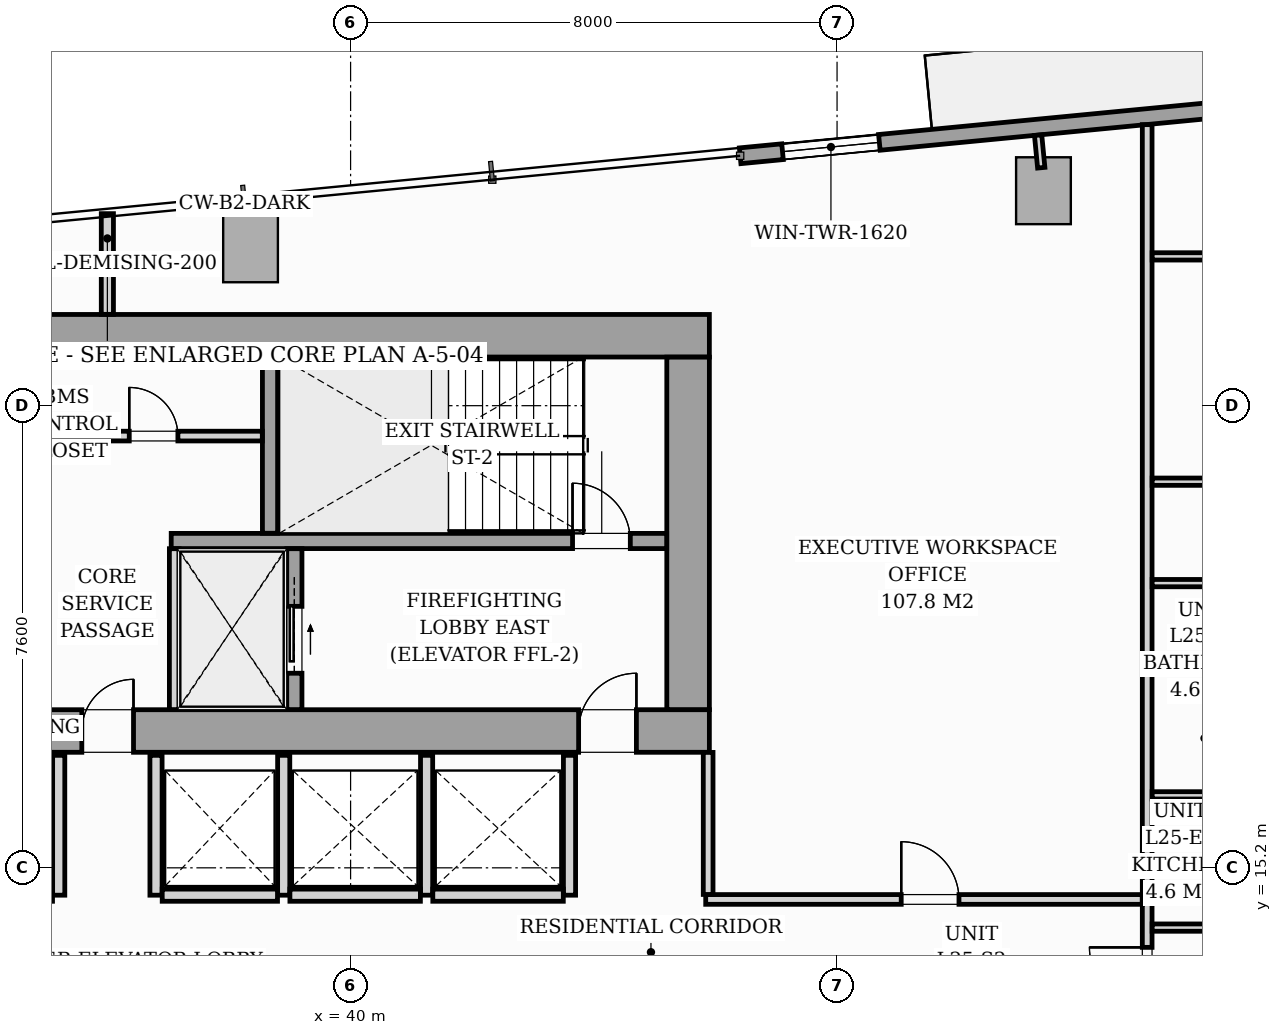
"""IFC4 building model, lengths in metres.
Left out: names, types, materials, properties, quantities, classifications, styles, units other than length and angle.
Written with IfcOpenShell. Run it as: python <this file> out.ifc"""

import sys

from ifc_helpers import new_model, si_unit, direction, frame, frame_2d, origin, origin_2d, place, context, subcontext, project, spatial, rectangle, i_section, extrude, source, transform, mapped, element, fill, save


model = new_model("IFC4")
c1 = context("Model", 3, precision=1e-05, world=origin(), true_north=direction((0.0, 1.0)))
c2 = subcontext(c1, "Body", "Model", "MODEL_VIEW")
j1 = project(units=[si_unit("LENGTHUNIT", "METRE"), si_unit("PLANEANGLEUNIT", "RADIAN")], contexts=[c1])
p1 = place(None, origin())
s1 = spatial("IfcSite", under=j1, at=p1, CompositionType="ELEMENT")
p2 = place(p1, origin())
s2 = spatial("IfcBuilding", under=s1, at=p2, CompositionType="ELEMENT")
p3 = place(p2, frame((0.0, 0.0, 90.6)))
s3 = spatial("IfcBuildingStorey", under=s2, at=p3, CompositionType="ELEMENT", Elevation=90.6)
m1 = source(origin(), c2, "Body", "SweptSolid", [
    extrude(i_section(OverallWidth=0.427, OverallDepth=0.483, WebThickness=0.051, FlangeThickness=0.082, FilletRadius=0.018, at=origin_2d()), origin(), (0.0, 0.0, 1.0), 3.196),
])
for number, where, z_axis, x_axis in (
    (1, (38.88, 17.4, 0.002), (0.0, 0.0, 1.0), (1.0, 0.0, 0.0)),
    (2, (45.6, 17.4, 0.002), (0.0, 0.0, 1.0), (1.0, 0.0, 0.0)),
    (3, (38.88, 24.0, 0.002), (0.0, 0.0, 1.0), (1.0, 0.0, 0.0)),
    (4, (45.6, 24.0, 0.002), (0.0, 0.0, 1.0), (1.0, 0.0, 0.0)),
):
    element("IfcColumn", number, at=place(p3, frame(where, z_axis=z_axis, x_axis=x_axis)), inside=s3, PredefinedType="PILASTER", context=c2, shape_type="MappedRepresentation", body=[
        mapped(m1, transform((0.0, 0.0, 0.0), scale=1.0)),
    ])
m2 = source(origin(), c2, "Body", "SweptSolid", [
    extrude(rectangle(XDim=0.9, YDim=1.1, at=origin_2d()), origin(), (0.0, 0.0, 1.0), 3.196),
])
for number, where, z_axis, x_axis in (
    (5, (38.354, 25.38, 0.002), (0.0, 0.0, 1.0), (0.995, 0.096, 0.0)),
    (6, (51.394, 26.335, 0.002), (0.0, 0.0, 1.0), (0.995, 0.096, 0.0)),
):
    element("IfcColumn", number, at=place(p3, frame(where, z_axis=z_axis, x_axis=x_axis)), inside=s3, PredefinedType="COLUMN", context=c2, shape_type="MappedRepresentation", body=[
        mapped(m2, transform((0.0, 0.0, 0.0), scale=1.0)),
    ])
p4 = place(p3, frame((46.406, 26.91, 0.0), z_axis=(0.0, 0.0, 1.0), x_axis=(0.995396638587, 0.095841180552, 0.0)))
e7 = element("IfcWall", 7, at=p4, inside=s3, PredefinedType="STANDARD", context=c2, shape_type="SweptSolid", body=[
    extrude(rectangle(XDim=19.11, YDim=0.26, at=frame_2d((9.555, 0.0))), origin(), (0.0, 0.0, 1.0), 2.94),
])
p5 = place(p4, frame((9.4, 0.0, 0.0)))
e8 = element("IfcOpeningElement", 8, at=p5, cuts=e7, PredefinedType="OPENING", context=c2, shape_type="SweptSolid", body=[
    extrude(rectangle(XDim=1.8, YDim=2.06, at=frame_2d((0.9, 1.03))), frame((0.0, 0.14, 0.0), z_axis=(0.0, -1.0, 0.0), x_axis=(1.0, 0.0, 0.0)), (0.0, 0.0, 1.0), 0.28),
])
p6 = place(p4, frame((0.7, 0.0, 0.65)))
e9 = element("IfcOpeningElement", 9, at=p6, cuts=e7, PredefinedType="OPENING", context=c2, shape_type="SweptSolid", body=[
    extrude(rectangle(XDim=1.6, YDim=1.5, at=frame_2d((0.8, 0.75))), frame((0.0, 0.14, 0.0), z_axis=(0.0, -1.0, 0.0), x_axis=(1.0, 0.0, 0.0)), (0.0, 0.0, 1.0), 0.28),
])
p7 = place(p3, frame((26.1, 17.45, 0.0), z_axis=(0.0, 0.0, 1.0), x_axis=(1.0, 0.0, 0.0)))
e10 = element("IfcWall", 10, at=p7, inside=s3, PredefinedType="SHEAR", context=c2, shape_type="SweptSolid", body=[
    extrude(rectangle(XDim=19.8, YDim=0.7, at=frame_2d((9.9, 0.0))), origin(), (0.0, 0.0, 1.0), 3.2),
])
p8 = place(p7, frame((1.05, 0.0, 0.0)))
e11 = element("IfcOpeningElement", 11, at=p8, cuts=e10, PredefinedType="OPENING", context=c2, shape_type="SweptSolid", body=[
    extrude(rectangle(XDim=0.95, YDim=2.06, at=frame_2d((0.475, 1.03))), frame((0.0, 0.36, 0.0), z_axis=(0.0, -1.0, 0.0), x_axis=(1.0, 0.0, 0.0)), (0.0, 0.0, 1.0), 0.72),
])
p9 = place(p7, frame((9.48, 0.0, 0.0)))
e12 = element("IfcOpeningElement", 12, at=p9, cuts=e10, PredefinedType="OPENING", context=c2, shape_type="SweptSolid", body=[
    extrude(rectangle(XDim=0.85, YDim=2.0, at=frame_2d((0.425, 1.0))), frame((0.0, 0.36, 0.0), z_axis=(0.0, -1.0, 0.0), x_axis=(1.0, 0.0, 0.0)), (0.0, 0.0, 1.0), 0.72),
])
p10 = place(p7, frame((17.65, 0.0, 0.0)))
e13 = element("IfcOpeningElement", 13, at=p10, cuts=e10, PredefinedType="OPENING", context=c2, shape_type="SweptSolid", body=[
    extrude(rectangle(XDim=0.95, YDim=2.06, at=frame_2d((0.475, 1.03))), frame((0.0, 0.36, 0.0), z_axis=(0.0, -1.0, 0.0), x_axis=(1.0, 0.0, 0.0)), (0.0, 0.0, 1.0), 0.72),
])
p11 = place(p3, frame((26.1, 23.95, 0.0), z_axis=(0.0, 0.0, 1.0), x_axis=(1.0, 0.0, 0.0)))
e14 = element("IfcWall", 14, at=p11, inside=s3, PredefinedType="SHEAR", context=c2, shape_type="SweptSolid", body=[
    extrude(rectangle(XDim=19.8, YDim=0.7, at=frame_2d((9.9, 0.0))), origin(), (0.0, 0.0, 1.0), 3.2),
])
p12 = place(p3, frame((45.55, 17.802, 0.0), z_axis=(0.0, 0.0, 1.0), x_axis=(0.0, 1.0, 0.0)))
e15 = element("IfcWall", 15, at=p12, inside=s3, PredefinedType="SHEAR", context=c2, shape_type="SweptSolid", body=[
    extrude(rectangle(XDim=5.796, YDim=0.7, at=frame_2d((2.898, 0.0))), origin(), (0.0, 0.0, 1.0), 3.2),
])
p13 = place(p3, frame((37.05, 20.575, 0.0), z_axis=(0.0, 0.0, 1.0), x_axis=(1.0, 0.0, 0.0)))
e16 = element("IfcWall", 16, at=p13, inside=s3, PredefinedType="SOLIDWALL", context=c2, shape_type="SweptSolid", body=[
    extrude(rectangle(XDim=8.148, YDim=0.25, at=frame_2d((4.074, 0.0))), origin(), (0.0, 0.0, 1.0), 3.2),
])
p14 = place(p13, frame((6.6, 0.0, 0.0)))
e17 = element("IfcOpeningElement", 17, at=p14, cuts=e16, PredefinedType="OPENING", context=c2, shape_type="SweptSolid", body=[
    extrude(rectangle(XDim=0.95, YDim=2.06, at=frame_2d((0.475, 1.03))), frame((0.0, 0.135, 0.0), z_axis=(0.0, -1.0, 0.0), x_axis=(1.0, 0.0, 0.0)), (0.0, 0.0, 1.0), 0.27),
])
p15 = place(p3, frame((38.675, 20.702, 0.0), z_axis=(0.0, 0.0, 1.0), x_axis=(0.0, 1.0, 0.0)))
e18 = element("IfcWall", 18, at=p15, inside=s3, PredefinedType="SOLIDWALL", context=c2, shape_type="SweptSolid", body=[
    extrude(rectangle(XDim=2.896, YDim=0.25, at=frame_2d((1.448, 0.0))), origin(), (0.0, 0.0, 1.0), 3.2),
])
p16 = place(p3, frame((37.1, 17.802, 0.0), z_axis=(0.0, 0.0, 1.0), x_axis=(0.0, 1.0, 0.0)))
e19 = element("IfcWall", 19, at=p16, inside=s3, PredefinedType="PARTITIONING", context=c2, shape_type="SweptSolid", body=[
    extrude(rectangle(XDim=2.646, YDim=0.16, at=frame_2d((1.323, 0.0))), origin(), (0.0, 0.0, 1.0), 2.94),
])
p17 = place(p3, frame((39.075, 17.802, 0.0), z_axis=(0.0, 0.0, 1.0), x_axis=(0.0, 1.0, 0.0)))
e20 = element("IfcWall", 20, at=p17, inside=s3, PredefinedType="SOLIDWALL", context=c2, shape_type="SweptSolid", body=[
    extrude(rectangle(XDim=2.646, YDim=0.25, at=frame_2d((1.323, 0.0))), origin(), (0.0, 0.0, 1.0), 3.2),
])
p18 = place(p17, frame((0.598, 0.0, 0.0)))
e21 = element("IfcOpeningElement", 21, at=p18, cuts=e20, PredefinedType="OPENING", context=c2, shape_type="SweptSolid", body=[
    extrude(rectangle(XDim=1.1, YDim=2.08, at=frame_2d((0.55, 1.04))), frame((0.0, 0.135, 0.0), z_axis=(0.0, -1.0, 0.0), x_axis=(1.0, 0.0, 0.0)), (0.0, 0.0, 1.0), 0.27),
])
p19 = place(p3, frame((34.982, 22.3, 0.0), z_axis=(0.0, 0.0, 1.0), x_axis=(1.0, 0.0, 0.0)))
e22 = element("IfcWall", 22, at=p19, inside=s3, PredefinedType="PARTITIONING", context=c2, shape_type="SweptSolid", body=[
    extrude(rectangle(XDim=3.566, YDim=0.16, at=frame_2d((1.783, 0.0))), origin(), (0.0, 0.0, 1.0), 2.94),
])
p20 = place(p19, frame((1.378, 0.0, 0.0)))
e23 = element("IfcOpeningElement", 23, at=p20, cuts=e22, PredefinedType="OPENING", context=c2, shape_type="SweptSolid", body=[
    extrude(rectangle(XDim=0.8, YDim=2.05, at=frame_2d((0.4, 1.025))), frame((0.0, 0.09, 0.0), z_axis=(0.0, -1.0, 0.0), x_axis=(1.0, 0.0, 0.0)), (0.0, 0.0, 1.0), 0.18),
])
for number, where, z_axis, x_axis in (
    (24, (35.2, 14.75, 0.0), (0.0, 0.0, 1.0), (0.0, 1.0, 0.0)),
    (25, (36.8, 14.75, 0.0), (0.0, 0.0, 1.0), (0.0, 1.0, 0.0)),
    (26, (38.9, 14.75, 0.0), (0.0, 0.0, 1.0), (0.0, 1.0, 0.0)),
):
    element("IfcWall", number, at=place(p3, frame(where, z_axis=z_axis, x_axis=x_axis)), inside=s3, PredefinedType="PARTITIONING", context=c2, shape_type="SweptSolid", body=[
        extrude(rectangle(XDim=2.3, YDim=0.2, at=frame_2d((1.15, 0.0))), origin(), (0.0, 0.0, 1.0), 2.94),
    ])
p21 = place(p3, frame((36.902, 14.75, 0.0), z_axis=(0.0, 0.0, 1.0), x_axis=(1.0, 0.0, 0.0)))
e27 = element("IfcWall", 27, at=p21, inside=s3, PredefinedType="PARTITIONING", context=c2, shape_type="SweptSolid", body=[
    extrude(rectangle(XDim=1.896, YDim=0.2, at=frame_2d((0.948, 0.0))), origin(), (0.0, 0.0, 1.0), 2.94),
])
for number, where, z_axis, x_axis in (
    (28, (41.25, 14.75, 0.0), (0.0, 0.0, 1.0), (0.0, 1.0, 0.0)),
    (29, (43.6, 14.75, 0.0), (0.0, 0.0, 1.0), (0.0, 1.0, 0.0)),
):
    element("IfcWall", number, at=place(p3, frame(where, z_axis=z_axis, x_axis=x_axis)), inside=s3, PredefinedType="PARTITIONING", context=c2, shape_type="SweptSolid", body=[
        extrude(rectangle(XDim=2.3, YDim=0.2, at=frame_2d((1.15, 0.0))), origin(), (0.0, 0.0, 1.0), 2.94),
    ])
for number, where, z_axis, x_axis in (
    (30, (39.002, 14.75, 0.0), (0.0, 0.0, 1.0), (1.0, 0.0, 0.0)),
    (31, (41.352, 14.75, 0.0), (0.0, 0.0, 1.0), (1.0, 0.0, 0.0)),
):
    element("IfcWall", number, at=place(p3, frame(where, z_axis=z_axis, x_axis=x_axis)), inside=s3, PredefinedType="PARTITIONING", context=c2, shape_type="SweptSolid", body=[
        extrude(rectangle(XDim=2.146, YDim=0.2, at=frame_2d((1.073, 0.0))), origin(), (0.0, 0.0, 1.0), 2.94),
    ])
p22 = place(p3, frame((53.1, 12.572, 0.0), z_axis=(0.0, 0.0, 1.0), x_axis=(0.0, 1.0, 0.0)))
e32 = element("IfcWall", 32, at=p22, inside=s3, PredefinedType="PARTITIONING", context=c2, shape_type="SweptSolid", body=[
    extrude(rectangle(XDim=14.849, YDim=0.16, at=frame_2d((7.425, 0.0))), origin(), (0.0, 0.0, 1.0), 2.94),
])
p23 = place(p22, frame((0.37, 0.0, 0.0)))
e33 = element("IfcOpeningElement", 33, at=p23, cuts=e32, PredefinedType="OPENING", context=c2, shape_type="SweptSolid", body=[
    extrude(rectangle(XDim=0.95, YDim=2.06, at=frame_2d((0.475, 1.03))), frame((0.0, 0.09, 0.0), z_axis=(0.0, -1.0, 0.0), x_axis=(1.0, 0.0, 0.0)), (0.0, 0.0, 1.0), 0.18),
])
p24 = place(p3, frame((36.0, 24.302, 0.0), z_axis=(0.0, 0.0, 1.0), x_axis=(0.0, 1.0, 0.0)))
e34 = element("IfcWall", 34, at=p24, inside=s3, PredefinedType="PARTITIONING", context=c2, shape_type="SweptSolid", body=[
    extrude(rectangle(XDim=1.656, YDim=0.2, at=frame_2d((0.828, 0.0))), origin(), (0.0, 0.0, 1.0), 2.94),
])
for number, where, z_axis, x_axis in (
    (35, (53.182, 16.392, 0.0), (0.0, 0.0, 1.0), (1.0, 0.0, 0.0)),
    (36, (53.182, 14.217, 0.0), (0.0, 0.0, 1.0), (1.0, 0.0, 0.0)),
    (37, (53.182, 18.567, 0.0), (0.0, 0.0, 1.0), (1.0, 0.0, 0.0)),
):
    element("IfcWall", number, at=place(p3, frame(where, z_axis=z_axis, x_axis=x_axis)), inside=s3, PredefinedType="PARTITIONING", context=c2, shape_type="SweptSolid", body=[
        extrude(rectangle(XDim=2.256, YDim=0.12, at=frame_2d((1.128, 0.0))), origin(), (0.0, 0.0, 1.0), 2.94),
    ])
p25 = place(p3, frame((53.182, 25.255, 0.0), z_axis=(0.0, 0.0, 1.0), x_axis=(1.0, 0.0, 0.0)))
e38 = element("IfcWall", 38, at=p25, inside=s3, PredefinedType="PARTITIONING", context=c2, shape_type="SweptSolid", body=[
    extrude(rectangle(XDim=7.451, YDim=0.12, at=frame_2d((3.726, 0.0))), origin(), (0.0, 0.0, 1.0), 2.94),
])
p26 = place(p25, frame((3.331, 0.0, 0.0)))
e39 = element("IfcOpeningElement", 39, at=p26, cuts=e38, PredefinedType="OPENING", context=c2, shape_type="SweptSolid", body=[
    extrude(rectangle(XDim=0.85, YDim=2.05, at=frame_2d((0.425, 1.025))), frame((0.0, 0.07, 0.0), z_axis=(0.0, -1.0, 0.0), x_axis=(1.0, 0.0, 0.0)), (0.0, 0.0, 1.0), 0.14),
])
p27 = place(p3, frame((53.182, 21.55, 0.0), z_axis=(0.0, 0.0, 1.0), x_axis=(1.0, 0.0, 0.0)))
e40 = element("IfcWall", 40, at=p27, inside=s3, PredefinedType="PARTITIONING", context=c2, shape_type="SweptSolid", body=[
    extrude(rectangle(XDim=15.37, YDim=0.12, at=frame_2d((7.685, 0.0))), origin(), (0.0, 0.0, 1.0), 2.94),
])
p28 = place(p27, frame((5.223, 0.0, 0.0)))
e41 = element("IfcOpeningElement", 41, at=p28, cuts=e40, PredefinedType="OPENING", context=c2, shape_type="SweptSolid", body=[
    extrude(rectangle(XDim=0.85, YDim=2.05, at=frame_2d((0.425, 1.025))), frame((0.0, 0.07, 0.0), z_axis=(0.0, -1.0, 0.0), x_axis=(1.0, 0.0, 0.0)), (0.0, 0.0, 1.0), 0.14),
])
p29 = place(p3, frame((53.182, 19.882, 0.0), z_axis=(0.0, 0.0, 1.0), x_axis=(1.0, 0.0, 0.0)))
e42 = element("IfcWall", 42, at=p29, inside=s3, PredefinedType="PARTITIONING", context=c2, shape_type="SweptSolid", body=[
    extrude(rectangle(XDim=15.531, YDim=0.12, at=frame_2d((7.765, 0.0))), origin(), (0.0, 0.0, 1.0), 2.94),
])
p30 = place(p29, frame((5.223, 0.0, 0.0)))
e43 = element("IfcOpeningElement", 43, at=p30, cuts=e42, PredefinedType="OPENING", context=c2, shape_type="SweptSolid", body=[
    extrude(rectangle(XDim=0.85, YDim=2.05, at=frame_2d((0.425, 1.025))), frame((0.0, 0.07, 0.0), z_axis=(0.0, -1.0, 0.0), x_axis=(1.0, 0.0, 0.0)), (0.0, 0.0, 1.0), 0.14),
])
p31 = place(p3, frame((45.84, 14.68, 0.0), z_axis=(0.0, 0.0, 1.0), x_axis=(1.0, 0.0, 0.0)))
e44 = element("IfcWall", 44, at=p31, inside=s3, PredefinedType="PARTITIONING", context=c2, shape_type="SweptSolid", body=[
    extrude(rectangle(XDim=7.178, YDim=0.16, at=frame_2d((3.589, 0.0))), origin(), (0.0, 0.0, 1.0), 2.94),
])
p32 = place(p31, frame((3.215, 0.0, 0.0)))
e45 = element("IfcOpeningElement", 45, at=p32, cuts=e44, PredefinedType="OPENING", context=c2, shape_type="SweptSolid", body=[
    extrude(rectangle(XDim=0.95, YDim=2.06, at=frame_2d((0.475, 1.03))), frame((0.0, 0.09, 0.0), z_axis=(0.0, -1.0, 0.0), x_axis=(1.0, 0.0, 0.0)), (0.0, 0.0, 1.0), 0.18),
])
p33 = place(p3, frame((45.88, 14.762, 0.0), z_axis=(0.0, 0.0, 1.0), x_axis=(0.0, 1.0, 0.0)))
e46 = element("IfcWall", 46, at=p33, inside=s3, PredefinedType="PARTITIONING", context=c2, shape_type="SweptSolid", body=[
    extrude(rectangle(XDim=2.336, YDim=0.16, at=frame_2d((1.168, 0.0))), origin(), (0.0, 0.0, 1.0), 2.94),
])
p34 = place(p3, frame((51.358, 26.713, 0.0), z_axis=(0.0, 0.0, 1.0), x_axis=(-0.095772948675, 0.995403205893, 0.0)))
e47 = element("IfcWall", 47, at=p34, inside=s3, PredefinedType="PARTITIONING", context=c2, shape_type="SweptSolid", body=[
    extrude(rectangle(XDim=0.538, YDim=0.12, at=frame_2d((0.269, 0.0))), origin(), (0.0, 0.0, 1.0), 2.94),
])
m3 = source(origin(), c2, "Body", "SweptSolid", [
    extrude(rectangle(XDim=1.6, YDim=1.5, at=frame_2d((0.8, 0.75))), frame((0.0, 0.03, 0.0), z_axis=(0.0, -1.0, 0.0), x_axis=(1.0, 0.0, 0.0)), (0.0, 0.0, 1.0), 0.06),
])
p35 = place(p6, origin())
e48 = element("IfcWindow", 48, at=p35, inside=s3, PartitioningType="SINGLE_PANEL", PredefinedType="WINDOW", context=c2, shape_type="MappedRepresentation", body=[
    mapped(m3, transform((0.0, 0.0, 0.0), scale=1.0)),
])
fill(e9, e48)
m4 = source(origin(), c2, "Body", "SweptSolid", [
    extrude(rectangle(XDim=0.85, YDim=2.0, at=frame_2d((0.425, 1.0))), frame((0.0, 0.025, 0.0), z_axis=(0.0, -1.0, 0.0), x_axis=(1.0, 0.0, 0.0)), (0.0, 0.0, 1.0), 0.05),
])
p36 = place(p9, origin())
e49 = element("IfcDoor", 49, at=p36, inside=s3, OperationType="SINGLE_SWING_RIGHT", PredefinedType="DOOR", context=c2, shape_type="MappedRepresentation", body=[
    mapped(m4, transform((0.0, 0.0, 0.0), scale=1.0)),
])
fill(e12, e49)
m5 = source(origin(), c2, "Body", "SweptSolid", [
    extrude(rectangle(XDim=0.95, YDim=2.06, at=frame_2d((0.475, 1.03))), frame((0.0, 0.025, 0.0), z_axis=(0.0, -1.0, 0.0), x_axis=(1.0, 0.0, 0.0)), (0.0, 0.0, 1.0), 0.05),
])
p37 = place(p10, origin())
e50 = element("IfcDoor", 50, at=p37, inside=s3, OperationType="SINGLE_SWING_RIGHT", PredefinedType="DOOR", context=c2, shape_type="MappedRepresentation", body=[
    mapped(m5, transform((0.0, 0.0, 0.0), scale=1.0)),
])
fill(e13, e50)
p38 = place(p14, origin())
e51 = element("IfcDoor", 51, at=p38, inside=s3, OperationType="SINGLE_SWING_LEFT", PredefinedType="DOOR", context=c2, shape_type="MappedRepresentation", body=[
    mapped(m5, transform((0.0, 0.0, 0.0), scale=1.0)),
])
fill(e17, e51)
m6 = source(origin(), c2, "Body", "SweptSolid", [
    extrude(rectangle(XDim=1.1, YDim=2.08, at=frame_2d((0.55, 1.04))), frame((0.0, 0.025, 0.0), z_axis=(0.0, -1.0, 0.0), x_axis=(1.0, 0.0, 0.0)), (0.0, 0.0, 1.0), 0.05),
])
p39 = place(p18, origin())
e52 = element("IfcDoor", 52, at=p39, inside=s3, OperationType="SLIDING_TO_RIGHT", PredefinedType="DOOR", context=c2, shape_type="MappedRepresentation", body=[
    mapped(m6, transform((0.0, 0.0, 0.0), scale=1.0)),
])
fill(e21, e52)
m7 = source(origin(), c2, "Body", "SweptSolid", [
    extrude(rectangle(XDim=0.8, YDim=2.05, at=frame_2d((0.4, 1.025))), frame((0.0, 0.025, 0.0), z_axis=(0.0, -1.0, 0.0), x_axis=(1.0, 0.0, 0.0)), (0.0, 0.0, 1.0), 0.05),
])
p40 = place(p20, origin())
e53 = element("IfcDoor", 53, at=p40, inside=s3, OperationType="SINGLE_SWING_LEFT", PredefinedType="DOOR", context=c2, shape_type="MappedRepresentation", body=[
    mapped(m7, transform((0.0, 0.0, 0.0), scale=1.0)),
])
fill(e23, e53)
m8 = source(origin(), c2, "Body", "SweptSolid", [
    extrude(rectangle(XDim=0.95, YDim=2.06, at=frame_2d((0.475, 1.03))), frame((0.0, 0.025, 0.0), z_axis=(0.0, -1.0, 0.0), x_axis=(1.0, 0.0, 0.0)), (0.0, 0.0, 1.0), 0.05),
])
p41 = place(p23, origin())
e54 = element("IfcDoor", 54, at=p41, inside=s3, OperationType="SINGLE_SWING_RIGHT", PredefinedType="DOOR", context=c2, shape_type="MappedRepresentation", body=[
    mapped(m8, transform((0.0, 0.0, 0.0), scale=1.0)),
])
fill(e33, e54)
p42 = place(p32, origin())
e55 = element("IfcDoor", 55, at=p42, inside=s3, OperationType="SINGLE_SWING_LEFT", PredefinedType="DOOR", context=c2, shape_type="MappedRepresentation", body=[
    mapped(m8, transform((0.0, 0.0, 0.0), scale=1.0)),
])
fill(e45, e55)
save(model, sys.argv[1])
